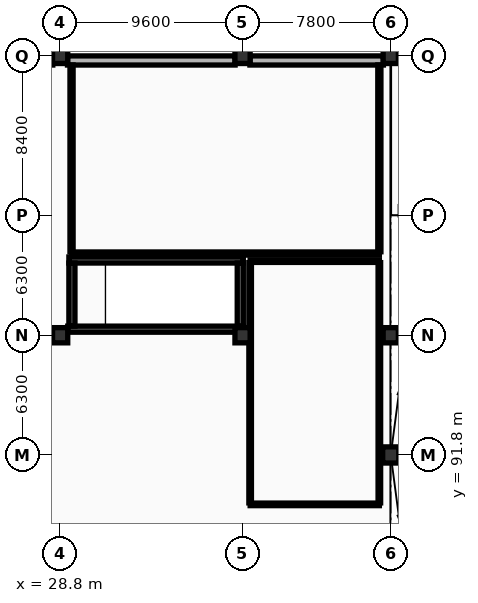
"""IFC4 building model, lengths in metres.
Left out: names, types, materials, properties, quantities, classifications, styles, units other than length and angle.
Written with IfcOpenShell. Run it as: python <this file> out.ifc"""

import sys

from ifc_helpers import new_model, si_unit, direction, frame, frame_2d, origin, origin_2d, place, context, subcontext, project, spatial, rectangle, circle, extrude, element, fill, save


model = new_model("IFC4")
c1 = context("Model", 3, precision=1e-05, world=origin(), true_north=direction((0.0, 1.0)))
c2 = subcontext(c1, "Body", "Model", "MODEL_VIEW")
j1 = project(units=[si_unit("LENGTHUNIT", "METRE"), si_unit("PLANEANGLEUNIT", "RADIAN")], contexts=[c1])
p1 = place(None, origin())
s1 = spatial("IfcSite", under=j1, at=p1, CompositionType="ELEMENT")
p2 = place(p1, origin())
s2 = spatial("IfcBuilding", under=s1, at=p2, CompositionType="ELEMENT")
p3 = place(p2, origin())
s3 = spatial("IfcBuildingStorey", under=s2, at=p3, CompositionType="ELEMENT", Elevation=0.0)
p4 = place(p3, frame((46.2, 91.8, 0.0), z_axis=(0.0, 0.0, 1.0), x_axis=(1.0, 0.0, 0.0)))
e1 = element("IfcColumn", 1, at=p4, inside=s3, PredefinedType="COLUMN", context=c2, shape_type="SweptSolid", body=[
    extrude(circle(Radius=0.425, at=origin_2d()), origin(), (0.0, 0.0, 1.0), 5.4),
])
for number, where, z_axis, x_axis in (
    (2, (28.8, 98.1, 0.0), (0.0, 0.0, 1.0), (1.0, 0.0, 0.0)),
    (3, (28.8, 112.8, 0.0), (0.0, 0.0, 1.0), (1.0, 0.0, 0.0)),
    (4, (38.4, 98.1, 0.0), (0.0, 0.0, 1.0), (1.0, 0.0, 0.0)),
    (5, (38.4, 112.8, 0.0), (0.0, 0.0, 1.0), (1.0, 0.0, 0.0)),
    (6, (46.2, 98.1, 0.0), (0.0, 0.0, 1.0), (1.0, 0.0, 0.0)),
    (7, (46.2, 112.8, 0.0), (0.0, 0.0, 1.0), (1.0, 0.0, 0.0)),
):
    element("IfcColumn", number, at=place(p3, frame(where, z_axis=z_axis, x_axis=x_axis)), inside=s3, PredefinedType="COLUMN", context=c2, shape_type="SweptSolid", body=[
        extrude(rectangle(XDim=0.8, YDim=0.8, at=origin_2d()), origin(), (0.0, 0.0, 1.0), 5.4),
    ])
p5 = place(p3, frame((19.587, 112.56, 0.0), z_axis=(0.0, 0.0, 1.0), x_axis=(1.0, 0.0, 0.0)))
e8 = element("IfcWall", 8, at=p5, inside=s3, PredefinedType="STANDARD", context=c2, shape_type="SweptSolid", body=[
    extrude(rectangle(XDim=8.826, YDim=0.48, at=frame_2d((4.413, 0.0))), origin(), (0.0, 0.0, 1.0), 4.18),
])
p6 = place(p5, frame((6.583, 0.0, 0.0)))
e9 = element("IfcOpeningElement", 9, at=p6, cuts=e8, PredefinedType="OPENING", context=c2, shape_type="SweptSolid", body=[
    extrude(rectangle(XDim=1.8, YDim=2.25, at=frame_2d((0.9, 1.125))), frame((0.0, 0.25, 0.0), z_axis=(0.0, -1.0, 0.0), x_axis=(1.0, 0.0, 0.0)), (0.0, 0.0, 1.0), 0.5),
])
p7 = place(p3, frame((29.187, 112.56, 0.0), z_axis=(0.0, 0.0, 1.0), x_axis=(1.0, 0.0, 0.0)))
e10 = element("IfcWall", 10, at=p7, inside=s3, PredefinedType="STANDARD", context=c2, shape_type="SweptSolid", body=[
    extrude(rectangle(XDim=8.821, YDim=0.48, at=frame_2d((4.411, 0.0))), origin(), (0.0, 0.0, 1.0), 4.18),
])
p8 = place(p7, frame((1.05, 0.0, 0.85)))
e11 = element("IfcOpeningElement", 11, at=p8, cuts=e10, PredefinedType="OPENING", context=c2, shape_type="SweptSolid", body=[
    extrude(rectangle(XDim=1.7, YDim=2.3, at=frame_2d((0.85, 1.15))), frame((0.0, 0.25, 0.0), z_axis=(0.0, -1.0, 0.0), x_axis=(1.0, 0.0, 0.0)), (0.0, 0.0, 1.0), 0.5),
])
p9 = place(p7, frame((3.563, 0.0, 0.85)))
e12 = element("IfcOpeningElement", 12, at=p9, cuts=e10, PredefinedType="OPENING", context=c2, shape_type="SweptSolid", body=[
    extrude(rectangle(XDim=1.7, YDim=2.3, at=frame_2d((0.85, 1.15))), frame((0.0, 0.25, 0.0), z_axis=(0.0, -1.0, 0.0), x_axis=(1.0, 0.0, 0.0)), (0.0, 0.0, 1.0), 0.5),
])
p10 = place(p7, frame((6.076, 0.0, 0.85)))
e13 = element("IfcOpeningElement", 13, at=p10, cuts=e10, PredefinedType="OPENING", context=c2, shape_type="SweptSolid", body=[
    extrude(rectangle(XDim=1.7, YDim=2.3, at=frame_2d((0.85, 1.15))), frame((0.0, 0.25, 0.0), z_axis=(0.0, -1.0, 0.0), x_axis=(1.0, 0.0, 0.0)), (0.0, 0.0, 1.0), 0.5),
])
p11 = place(p3, frame((38.787, 112.56, 0.0), z_axis=(0.0, 0.0, 1.0), x_axis=(1.0, 0.0, 0.0)))
e14 = element("IfcWall", 14, at=p11, inside=s3, PredefinedType="STANDARD", context=c2, shape_type="SweptSolid", body=[
    extrude(rectangle(XDim=7.026, YDim=0.48, at=frame_2d((3.513, 0.0))), origin(), (0.0, 0.0, 1.0), 4.18),
])
p12 = place(p11, frame((1.228, 0.0, 0.85)))
e15 = element("IfcOpeningElement", 15, at=p12, cuts=e14, PredefinedType="OPENING", context=c2, shape_type="SweptSolid", body=[
    extrude(rectangle(XDim=1.7, YDim=2.3, at=frame_2d((0.85, 1.15))), frame((0.0, 0.25, 0.0), z_axis=(0.0, -1.0, 0.0), x_axis=(1.0, 0.0, 0.0)), (0.0, 0.0, 1.0), 0.5),
])
p13 = place(p11, frame((4.098, 0.0, 0.85)))
e16 = element("IfcOpeningElement", 16, at=p13, cuts=e14, PredefinedType="OPENING", context=c2, shape_type="SweptSolid", body=[
    extrude(rectangle(XDim=1.7, YDim=2.3, at=frame_2d((0.85, 1.15))), frame((0.0, 0.25, 0.0), z_axis=(0.0, -1.0, 0.0), x_axis=(1.0, 0.0, 0.0)), (0.0, 0.0, 1.0), 0.5),
])
p14 = place(p3, frame((29.26, 102.06, 0.0), z_axis=(0.0, 0.0, 1.0), x_axis=(1.0, 0.0, 0.0)))
e17 = element("IfcWall", 17, at=p14, inside=s3, PredefinedType="SHEAR", context=c2, shape_type="SweptSolid", body=[
    extrude(rectangle(XDim=9.18, YDim=0.32, at=frame_2d((4.59, 0.0))), origin(), (0.0, 0.0, 1.0), 5.14),
])
p15 = place(p3, frame((38.44, 98.42, 0.0), z_axis=(0.0, 0.0, 1.0), x_axis=(-1.0, 0.0, 0.0)))
e18 = element("IfcWall", 18, at=p15, inside=s3, PredefinedType="SHEAR", context=c2, shape_type="SweptSolid", body=[
    extrude(rectangle(XDim=9.24, YDim=0.32, at=frame_2d((4.62, 0.0))), origin(), (0.0, 0.0, 1.0), 5.14),
])
p16 = place(p3, frame((29.42, 98.58, 0.0), z_axis=(0.0, 0.0, 1.0), x_axis=(0.0, 1.0, 0.0)))
e19 = element("IfcWall", 19, at=p16, inside=s3, PredefinedType="SHEAR", context=c2, shape_type="SweptSolid", body=[
    extrude(rectangle(XDim=3.32, YDim=0.32, at=frame_2d((1.66, 0.0))), origin(), (0.0, 0.0, 1.0), 5.14),
])
p17 = place(p16, frame((1.085, 0.0, 0.0)))
e20 = element("IfcOpeningElement", 20, at=p17, cuts=e19, PredefinedType="OPENING", context=c2, shape_type="SweptSolid", body=[
    extrude(rectangle(XDim=1.15, YDim=2.2, at=frame_2d((0.575, 1.1))), frame((0.0, 0.17, 0.0), z_axis=(0.0, -1.0, 0.0), x_axis=(1.0, 0.0, 0.0)), (0.0, 0.0, 1.0), 0.34),
])
p18 = place(p3, frame((38.28, 101.9, 0.0), z_axis=(0.0, 0.0, 1.0), x_axis=(0.0, -1.0, 0.0)))
e21 = element("IfcWall", 21, at=p18, inside=s3, PredefinedType="SHEAR", context=c2, shape_type="SweptSolid", body=[
    extrude(rectangle(XDim=3.32, YDim=0.32, at=frame_2d((1.66, 0.0))), origin(), (0.0, 0.0, 1.0), 5.14),
])
p19 = place(p3, frame((45.6, 102.4, 0.0), z_axis=(0.0, 0.0, 1.0), x_axis=(-1.0, 0.0, 0.0)))
e22 = element("IfcWall", 22, at=p19, inside=s3, PredefinedType="PARTITIONING", context=c2, shape_type="SweptSolid", body=[
    extrude(rectangle(XDim=16.2, YDim=0.165, at=frame_2d((8.1, 0.0))), origin(), (0.0, 0.0, 1.0), 4.18),
])
p20 = place(p3, frame((29.4, 102.492, 0.0), z_axis=(0.0, 0.0, 1.0), x_axis=(0.0, 1.0, 0.0)))
e23 = element("IfcWall", 23, at=p20, inside=s3, PredefinedType="PARTITIONING", context=c2, shape_type="SweptSolid", body=[
    extrude(rectangle(XDim=9.833, YDim=0.165, at=frame_2d((4.917, 0.0))), origin(), (0.0, 0.0, 1.0), 4.48),
])
p21 = place(p20, frame((1.977, 0.0, 0.0)))
e24 = element("IfcOpeningElement", 24, at=p21, cuts=e23, PredefinedType="OPENING", context=c2, shape_type="SweptSolid", body=[
    extrude(rectangle(XDim=1.0, YDim=2.15, at=frame_2d((0.5, 1.075))), frame((0.0, 0.093, 0.0), z_axis=(0.0, -1.0, 0.0), x_axis=(1.0, 0.0, 0.0)), (0.0, 0.0, 1.0), 0.185),
])
p22 = place(p3, frame((45.6, 112.326, 0.0), z_axis=(0.0, 0.0, 1.0), x_axis=(0.0, -1.0, 0.0)))
e25 = element("IfcWall", 25, at=p22, inside=s3, PredefinedType="PARTITIONING", context=c2, shape_type="SweptSolid", body=[
    extrude(rectangle(XDim=9.833, YDim=0.165, at=frame_2d((4.917, 0.0))), origin(), (0.0, 0.0, 1.0), 4.52),
])
p23 = place(p3, frame((38.8, 102.0, 0.0), z_axis=(0.0, 0.0, 1.0), x_axis=(1.0, 0.0, 0.0)))
e26 = element("IfcWall", 26, at=p23, inside=s3, PredefinedType="PARTITIONING", context=c2, shape_type="SweptSolid", body=[
    extrude(rectangle(XDim=6.8, YDim=0.135, at=frame_2d((3.4, 0.0))), origin(), (0.0, 0.0, 1.0), 4.18),
])
p24 = place(p3, frame((45.6, 89.2, 0.0), z_axis=(0.0, 0.0, 1.0), x_axis=(-1.0, 0.0, 0.0)))
e27 = element("IfcWall", 27, at=p24, inside=s3, PredefinedType="PARTITIONING", context=c2, shape_type="SweptSolid", body=[
    extrude(rectangle(XDim=6.8, YDim=0.135, at=frame_2d((3.4, 0.0))), origin(), (0.0, 0.0, 1.0), 4.23),
])
p25 = place(p24, frame((2.153, 0.0, 0.0)))
e28 = element("IfcOpeningElement", 28, at=p25, cuts=e27, PredefinedType="OPENING", context=c2, shape_type="SweptSolid", body=[
    extrude(rectangle(XDim=0.95, YDim=2.15, at=frame_2d((0.475, 1.075))), frame((0.0, 0.077, 0.0), z_axis=(0.0, -1.0, 0.0), x_axis=(1.0, 0.0, 0.0)), (0.0, 0.0, 1.0), 0.155),
])
p26 = place(p3, frame((38.8, 89.278, 0.0), z_axis=(0.0, 0.0, 1.0), x_axis=(0.0, 1.0, 0.0)))
e29 = element("IfcWall", 29, at=p26, inside=s3, PredefinedType="PARTITIONING", context=c2, shape_type="SweptSolid", body=[
    extrude(rectangle(XDim=12.645, YDim=0.135, at=frame_2d((6.323, 0.0))), origin(), (0.0, 0.0, 1.0), 4.18),
])
p27 = place(p3, frame((45.6, 101.923, 0.0), z_axis=(0.0, 0.0, 1.0), x_axis=(0.0, -1.0, 0.0)))
e30 = element("IfcWall", 30, at=p27, inside=s3, PredefinedType="PARTITIONING", context=c2, shape_type="SweptSolid", body=[
    extrude(rectangle(XDim=12.645, YDim=0.135, at=frame_2d((6.323, 0.0))), origin(), (0.0, 0.0, 1.0), 4.47),
])
p28 = place(p8, origin())
e31 = element("IfcWindow", 31, at=p28, inside=s3, PartitioningType="SINGLE_PANEL", PredefinedType="WINDOW", context=c2, shape_type="SweptSolid", body=[
    extrude(rectangle(XDim=1.7, YDim=2.3, at=frame_2d((0.85, 1.15))), frame((0.0, 0.03, 0.0), z_axis=(0.0, -1.0, 0.0), x_axis=(1.0, 0.0, 0.0)), (0.0, 0.0, 1.0), 0.06),
])
fill(e11, e31)
p29 = place(p9, origin())
e32 = element("IfcWindow", 32, at=p29, inside=s3, PartitioningType="SINGLE_PANEL", PredefinedType="WINDOW", context=c2, shape_type="SweptSolid", body=[
    extrude(rectangle(XDim=1.7, YDim=2.3, at=frame_2d((0.85, 1.15))), frame((0.0, 0.03, 0.0), z_axis=(0.0, -1.0, 0.0), x_axis=(1.0, 0.0, 0.0)), (0.0, 0.0, 1.0), 0.06),
])
fill(e12, e32)
p30 = place(p10, origin())
e33 = element("IfcWindow", 33, at=p30, inside=s3, PartitioningType="SINGLE_PANEL", PredefinedType="WINDOW", context=c2, shape_type="SweptSolid", body=[
    extrude(rectangle(XDim=1.7, YDim=2.3, at=frame_2d((0.85, 1.15))), frame((0.0, 0.03, 0.0), z_axis=(0.0, -1.0, 0.0), x_axis=(1.0, 0.0, 0.0)), (0.0, 0.0, 1.0), 0.06),
])
fill(e13, e33)
p31 = place(p12, origin())
e34 = element("IfcWindow", 34, at=p31, inside=s3, PartitioningType="SINGLE_PANEL", PredefinedType="WINDOW", context=c2, shape_type="SweptSolid", body=[
    extrude(rectangle(XDim=1.7, YDim=2.3, at=frame_2d((0.85, 1.15))), frame((0.0, 0.03, 0.0), z_axis=(0.0, -1.0, 0.0), x_axis=(1.0, 0.0, 0.0)), (0.0, 0.0, 1.0), 0.06),
])
fill(e15, e34)
p32 = place(p13, origin())
e35 = element("IfcWindow", 35, at=p32, inside=s3, PartitioningType="SINGLE_PANEL", PredefinedType="WINDOW", context=c2, shape_type="SweptSolid", body=[
    extrude(rectangle(XDim=1.7, YDim=2.3, at=frame_2d((0.85, 1.15))), frame((0.0, 0.03, 0.0), z_axis=(0.0, -1.0, 0.0), x_axis=(1.0, 0.0, 0.0)), (0.0, 0.0, 1.0), 0.06),
])
fill(e16, e35)
p33 = place(p17, origin())
e36 = element("IfcDoor", 36, at=p33, inside=s3, OperationType="SINGLE_SWING_RIGHT", PredefinedType="DOOR", context=c2, shape_type="SweptSolid", body=[
    extrude(rectangle(XDim=1.15, YDim=2.2, at=frame_2d((0.575, 1.1))), frame((0.0, 0.025, 0.0), z_axis=(0.0, -1.0, 0.0), x_axis=(1.0, 0.0, 0.0)), (0.0, 0.0, 1.0), 0.05),
])
fill(e20, e36)
p34 = place(p21, origin())
e37 = element("IfcDoor", 37, at=p34, inside=s3, OperationType="SINGLE_SWING_RIGHT", PredefinedType="DOOR", context=c2, shape_type="SweptSolid", body=[
    extrude(rectangle(XDim=1.0, YDim=2.15, at=frame_2d((0.5, 1.075))), frame((0.0, 0.025, 0.0), z_axis=(0.0, -1.0, 0.0), x_axis=(1.0, 0.0, 0.0)), (0.0, 0.0, 1.0), 0.05),
])
fill(e24, e37)
p35 = place(p25, origin())
e38 = element("IfcDoor", 38, at=p35, inside=s3, OperationType="SINGLE_SWING_LEFT", PredefinedType="DOOR", context=c2, shape_type="SweptSolid", body=[
    extrude(rectangle(XDim=0.95, YDim=2.15, at=frame_2d((0.475, 1.075))), frame((0.0, 0.025, 0.0), z_axis=(0.0, -1.0, 0.0), x_axis=(1.0, 0.0, 0.0)), (0.0, 0.0, 1.0), 0.05),
])
fill(e28, e38)
save(model, sys.argv[1])
